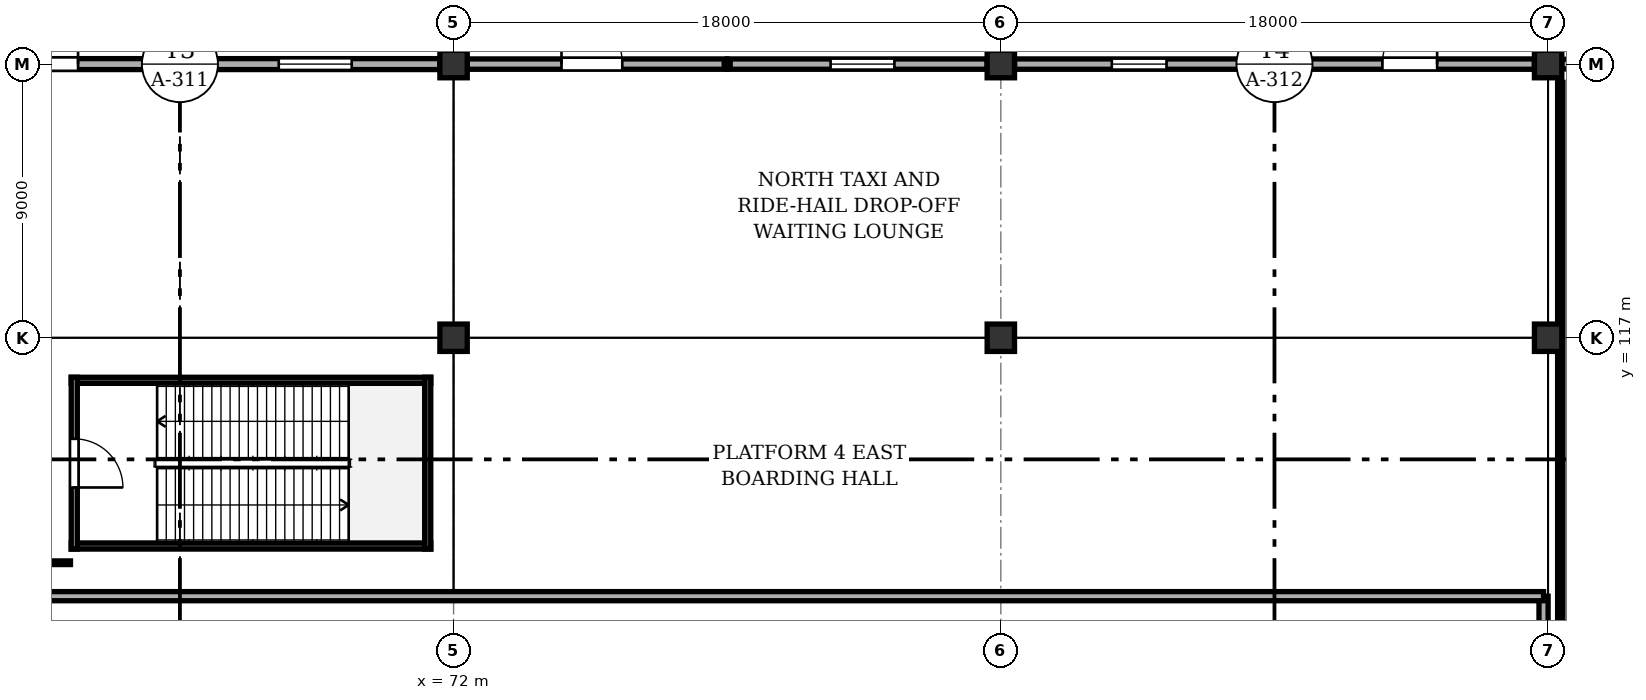
"""IFC4 building model, lengths in metres.
Left out: names, types, materials, properties, quantities, classifications, styles, units other than length and angle.
Written with IfcOpenShell. Run it as: python <this file> out.ifc"""

import sys

from ifc_helpers import new_model, si_unit, direction, frame, frame_2d, origin, origin_2d, place, context, subcontext, project, spatial, rectangle, i_section, extrude, element, fill, save


model = new_model("IFC4")
c1 = context("Model", 3, precision=1e-05, world=origin(), true_north=direction((0.0, 1.0)))
c2 = subcontext(c1, "Body", "Model", "MODEL_VIEW")
j1 = project(units=[si_unit("LENGTHUNIT", "METRE"), si_unit("PLANEANGLEUNIT", "RADIAN")], contexts=[c1])
p1 = place(None, origin())
s1 = spatial("IfcSite", under=j1, at=p1, CompositionType="ELEMENT")
p2 = place(p1, origin())
s2 = spatial("IfcBuilding", under=s1, at=p2, CompositionType="ELEMENT")
p3 = place(p2, origin())
s3 = spatial("IfcBuildingStorey", under=s2, at=p3, CompositionType="ELEMENT", Elevation=0.0)
for number, where, z_axis, x_axis in (
    (1, (72.0, 117.0, 0.0), (0.0, 0.0, 1.0), (1.0, 0.0, 0.0)),
    (2, (72.0, 126.0, 0.0), (0.0, 0.0, 1.0), (1.0, 0.0, 0.0)),
    (3, (90.0, 117.0, 0.0), (0.0, 0.0, 1.0), (1.0, 0.0, 0.0)),
    (4, (90.0, 126.0, 0.0), (0.0, 0.0, 1.0), (1.0, 0.0, 0.0)),
    (5, (108.0, 117.0, 0.0), (0.0, 0.0, 1.0), (1.0, 0.0, 0.0)),
    (6, (108.0, 126.0, 0.0), (0.0, 0.0, 1.0), (1.0, 0.0, 0.0)),
):
    element("IfcColumn", number, at=place(p3, frame(where, z_axis=z_axis, x_axis=x_axis)), inside=s3, PredefinedType="COLUMN", context=c2, shape_type="SweptSolid", body=[
        extrude(rectangle(XDim=0.9, YDim=0.9, at=origin_2d()), origin(), (0.0, 0.0, 1.0), 6.6),
    ])
p4 = place(p3, frame((63.0, 126.0, 0.0), z_axis=(0.0, 0.0, 1.0), x_axis=(1.0, 0.0, 0.0)))
e7 = element("IfcColumn", 7, at=p4, inside=s3, PredefinedType="PILASTER", context=c2, shape_type="SweptSolid", body=[
    extrude(rectangle(XDim=0.6, YDim=0.4, at=origin_2d()), origin(), (0.0, 0.0, 1.0), 6.28),
])
p5 = place(p3, frame((81.0, 126.0, 0.0), z_axis=(0.0, 0.0, 1.0), x_axis=(1.0, 0.0, 0.0)))
e8 = element("IfcColumn", 8, at=p5, inside=s3, PredefinedType="PILASTER", context=c2, shape_type="SweptSolid", body=[
    extrude(i_section(OverallWidth=0.2, OverallDepth=0.2, WebThickness=0.008, FlangeThickness=0.012, FilletRadius=0.013, at=origin_2d()), origin(), (0.0, 0.0, 1.0), 6.28),
])
p6 = place(p3, frame((99.0, 126.0, 0.0), z_axis=(0.0, 0.0, 1.0), x_axis=(1.0, 0.0, 0.0)))
e9 = element("IfcColumn", 9, at=p6, inside=s3, PredefinedType="PILASTER", context=c2, shape_type="SweptSolid", body=[
    extrude(rectangle(XDim=0.6, YDim=0.4, at=origin_2d()), origin(), (0.0, 0.0, 1.0), 6.28),
])
p7 = place(p3, frame((107.85, 103.5, -1.25), z_axis=(0.0, 0.0, 1.0), x_axis=(0.0, 1.0, 0.0)))
e10 = element("IfcWall", 10, at=p7, inside=s3, PredefinedType="SOLIDWALL", context=c2, shape_type="SweptSolid", body=[
    extrude(rectangle(XDim=5.0, YDim=0.3, at=frame_2d((2.5, 0.0))), origin(), (0.0, 0.0, 1.0), 2.5),
])
p8 = place(p3, frame((0.15, 108.5, -1.25), z_axis=(0.0, 0.0, 1.0), x_axis=(1.0, 0.0, 0.0)))
e11 = element("IfcWall", 11, at=p8, inside=s3, PredefinedType="SOLIDWALL", context=c2, shape_type="SweptSolid", body=[
    extrude(rectangle(XDim=107.7, YDim=0.3, at=frame_2d((53.85, 0.0))), origin(), (0.0, 0.0, 1.0), 0.87),
])
p9 = place(p3, frame((54.45, 126.0, 0.0), z_axis=(0.0, 0.0, 1.0), x_axis=(1.0, 0.0, 0.0)))
e12 = element("IfcWall", 12, at=p9, inside=s3, PredefinedType="SOLIDWALL", context=c2, shape_type="SweptSolid", body=[
    extrude(rectangle(XDim=8.25, YDim=0.36, at=frame_2d((4.125, 0.0))), origin(), (0.0, 0.0, 1.0), 5.79),
])
p10 = place(p9, frame((3.0, 0.0, 0.0)))
e13 = element("IfcOpeningElement", 13, at=p10, cuts=e12, PredefinedType="OPENING", context=c2, shape_type="SweptSolid", body=[
    extrude(rectangle(XDim=2.2, YDim=2.45, at=frame_2d((1.1, 1.225))), frame((0.0, 0.19, 0.0), z_axis=(0.0, -1.0, 0.0), x_axis=(1.0, 0.0, 0.0)), (0.0, 0.0, 1.0), 0.38),
])
p11 = place(p3, frame((63.3, 126.0, 0.0), z_axis=(0.0, 0.0, 1.0), x_axis=(1.0, 0.0, 0.0)))
e14 = element("IfcWall", 14, at=p11, inside=s3, PredefinedType="SOLIDWALL", context=c2, shape_type="SweptSolid", body=[
    extrude(rectangle(XDim=8.25, YDim=0.36, at=frame_2d((4.125, 0.0))), origin(), (0.0, 0.0, 1.0), 5.79),
])
p12 = place(p11, frame((2.95, 0.0, 0.95)))
e15 = element("IfcOpeningElement", 15, at=p12, cuts=e14, PredefinedType="OPENING", context=c2, shape_type="SweptSolid", body=[
    extrude(rectangle(XDim=2.4, YDim=2.1, at=frame_2d((1.2, 1.05))), frame((0.0, 0.19, 0.0), z_axis=(0.0, -1.0, 0.0), x_axis=(1.0, 0.0, 0.0)), (0.0, 0.0, 1.0), 0.38),
])
p13 = place(p3, frame((72.45, 126.0, 0.0), z_axis=(0.0, 0.0, 1.0), x_axis=(1.0, 0.0, 0.0)))
e16 = element("IfcWall", 16, at=p13, inside=s3, PredefinedType="SOLIDWALL", context=c2, shape_type="SweptSolid", body=[
    extrude(rectangle(XDim=8.546, YDim=0.34, at=frame_2d((4.273, 0.0))), origin(), (0.0, 0.0, 1.0), 5.79),
])
p14 = place(p13, frame((3.1, 0.0, 0.0)))
e17 = element("IfcOpeningElement", 17, at=p14, cuts=e16, PredefinedType="OPENING", context=c2, shape_type="SweptSolid", body=[
    extrude(rectangle(XDim=2.0, YDim=2.4, at=frame_2d((1.0, 1.2))), frame((0.0, 0.18, 0.0), z_axis=(0.0, -1.0, 0.0), x_axis=(1.0, 0.0, 0.0)), (0.0, 0.0, 1.0), 0.36),
])
p15 = place(p3, frame((81.004, 126.0, 0.0), z_axis=(0.0, 0.0, 1.0), x_axis=(1.0, 0.0, 0.0)))
e18 = element("IfcWall", 18, at=p15, inside=s3, PredefinedType="SOLIDWALL", context=c2, shape_type="SweptSolid", body=[
    extrude(rectangle(XDim=8.546, YDim=0.34, at=frame_2d((4.273, 0.0))), origin(), (0.0, 0.0, 1.0), 5.79),
])
p16 = place(p15, frame((3.396, 0.0, 0.95)))
e19 = element("IfcOpeningElement", 19, at=p16, cuts=e18, PredefinedType="OPENING", context=c2, shape_type="SweptSolid", body=[
    extrude(rectangle(XDim=2.1, YDim=2.0, at=frame_2d((1.05, 1.0))), frame((0.0, 0.18, 0.0), z_axis=(0.0, -1.0, 0.0), x_axis=(1.0, 0.0, 0.0)), (0.0, 0.0, 1.0), 0.36),
])
p17 = place(p3, frame((90.45, 126.0, 0.0), z_axis=(0.0, 0.0, 1.0), x_axis=(1.0, 0.0, 0.0)))
e20 = element("IfcWall", 20, at=p17, inside=s3, PredefinedType="SOLIDWALL", context=c2, shape_type="SweptSolid", body=[
    extrude(rectangle(XDim=8.25, YDim=0.34, at=frame_2d((4.125, 0.0))), origin(), (0.0, 0.0, 1.0), 5.79),
])
p18 = place(p17, frame((3.2, 0.0, 0.95)))
e21 = element("IfcOpeningElement", 21, at=p18, cuts=e20, PredefinedType="OPENING", context=c2, shape_type="SweptSolid", body=[
    extrude(rectangle(XDim=1.8, YDim=2.0, at=frame_2d((0.9, 1.0))), frame((0.0, 0.18, 0.0), z_axis=(0.0, -1.0, 0.0), x_axis=(1.0, 0.0, 0.0)), (0.0, 0.0, 1.0), 0.36),
])
p19 = place(p3, frame((99.3, 126.0, 0.0), z_axis=(0.0, 0.0, 1.0), x_axis=(1.0, 0.0, 0.0)))
e22 = element("IfcWall", 22, at=p19, inside=s3, PredefinedType="SOLIDWALL", context=c2, shape_type="SweptSolid", body=[
    extrude(rectangle(XDim=8.25, YDim=0.34, at=frame_2d((4.125, 0.0))), origin(), (0.0, 0.0, 1.0), 5.79),
])
p20 = place(p19, frame((3.25, 0.0, 0.0)))
e23 = element("IfcOpeningElement", 23, at=p20, cuts=e22, PredefinedType="OPENING", context=c2, shape_type="SweptSolid", body=[
    extrude(rectangle(XDim=1.8, YDim=2.35, at=frame_2d((0.9, 1.175))), frame((0.0, 0.18, 0.0), z_axis=(0.0, -1.0, 0.0), x_axis=(1.0, 0.0, 0.0)), (0.0, 0.0, 1.0), 0.36),
])
p21 = place(p3, frame((108.45, 126.0, 0.0), z_axis=(0.0, 0.0, 1.0), x_axis=(1.0, 0.0, 0.0)))
e24 = element("IfcWall", 24, at=p21, inside=s3, PredefinedType="SOLIDWALL", context=c2, shape_type="SweptSolid", body=[
    extrude(rectangle(XDim=8.1, YDim=0.32, at=frame_2d((4.05, 0.0))), origin(), (0.0, 0.0, 1.0), 5.79),
])
p22 = place(p21, frame((3.3, 0.0, 0.95)))
e25 = element("IfcOpeningElement", 25, at=p22, cuts=e24, PredefinedType="OPENING", context=c2, shape_type="SweptSolid", body=[
    extrude(rectangle(XDim=1.6, YDim=1.9, at=frame_2d((0.8, 0.95))), frame((0.0, 0.17, 0.0), z_axis=(0.0, -1.0, 0.0), x_axis=(1.0, 0.0, 0.0)), (0.0, 0.0, 1.0), 0.34),
])
for number, where, z_axis, x_axis in (
    (26, (59.425, 110.15, 0.0), (0.0, 0.0, 1.0), (1.0, 0.0, 0.0)),
    (27, (71.25, 115.6, 0.0), (0.0, 0.0, 1.0), (-1.0, 0.0, 0.0)),
):
    element("IfcWall", number, at=place(p3, frame(where, z_axis=z_axis, x_axis=x_axis)), inside=s3, PredefinedType="SOLIDWALL", context=c2, shape_type="SweptSolid", body=[
        extrude(rectangle(XDim=11.825, YDim=0.2, at=frame_2d((5.913, 0.0))), origin(), (0.0, 0.0, 1.0), 6.32),
    ])
p23 = place(p3, frame((71.15, 110.05, 0.0), z_axis=(0.0, 0.0, 1.0), x_axis=(0.0, 1.0, 0.0)))
e28 = element("IfcWall", 28, at=p23, inside=s3, PredefinedType="SOLIDWALL", context=c2, shape_type="SweptSolid", body=[
    extrude(rectangle(XDim=5.65, YDim=0.2, at=frame_2d((2.825, 0.0))), origin(), (0.0, 0.0, 1.0), 6.32),
])
p24 = place(p3, frame((59.525, 115.7, 0.0), z_axis=(0.0, 0.0, 1.0), x_axis=(0.0, -1.0, 0.0)))
e29 = element("IfcWall", 29, at=p24, inside=s3, PredefinedType="SOLIDWALL", context=c2, shape_type="SweptSolid", body=[
    extrude(rectangle(XDim=5.65, YDim=0.2, at=frame_2d((2.825, 0.0))), origin(), (0.0, 0.0, 1.0), 4.4),
])
p25 = place(p24, frame((2.025, 0.0, 0.0)))
e30 = element("IfcOpeningElement", 30, at=p25, cuts=e29, PredefinedType="OPENING", context=c2, shape_type="SweptSolid", body=[
    extrude(rectangle(XDim=1.6, YDim=2.15, at=frame_2d((0.8, 1.075))), frame((0.0, 0.11, 0.0), z_axis=(0.0, -1.0, 0.0), x_axis=(1.0, 0.0, 0.0)), (0.0, 0.0, 1.0), 0.22),
])
p26 = place(p3, frame((59.4, 109.6, 0.0), z_axis=(0.0, 0.0, 1.0), x_axis=(-1.0, 0.0, 0.0)))
e31 = element("IfcWall", 31, at=p26, inside=s3, PredefinedType="PARTITIONING", context=c2, shape_type="SweptSolid", body=[
    extrude(rectangle(XDim=2.6, YDim=0.12, at=frame_2d((1.3, 0.0))), origin(), (0.0, 0.0, 1.0), 4.4),
])
p27 = place(p3, frame((108.4, 104.6, 0.0), z_axis=(0.0, 0.0, 1.0), x_axis=(0.0, 1.0, 0.0)))
e32 = element("IfcWall", 32, at=p27, inside=s3, PredefinedType="PARTITIONING", context=c2, shape_type="SweptSolid", body=[
    extrude(rectangle(XDim=20.8, YDim=0.175, at=frame_2d((10.4, 0.0))), origin(), (0.0, 0.0, 1.0), 4.4),
])
p28 = place(p10, origin())
e33 = element("IfcDoor", 33, at=p28, inside=s3, OperationType="SINGLE_SWING_RIGHT", PredefinedType="DOOR", context=c2, shape_type="SweptSolid", body=[
    extrude(rectangle(XDim=2.2, YDim=2.45, at=frame_2d((1.1, 1.225))), frame((0.0, 0.025, 0.0), z_axis=(0.0, -1.0, 0.0), x_axis=(1.0, 0.0, 0.0)), (0.0, 0.0, 1.0), 0.05),
])
fill(e13, e33)
p29 = place(p12, origin())
e34 = element("IfcWindow", 34, at=p29, inside=s3, PartitioningType="SINGLE_PANEL", PredefinedType="WINDOW", context=c2, shape_type="SweptSolid", body=[
    extrude(rectangle(XDim=2.4, YDim=2.1, at=frame_2d((1.2, 1.05))), frame((0.0, 0.03, 0.0), z_axis=(0.0, -1.0, 0.0), x_axis=(1.0, 0.0, 0.0)), (0.0, 0.0, 1.0), 0.06),
])
fill(e15, e34)
p30 = place(p14, origin())
e35 = element("IfcDoor", 35, at=p30, inside=s3, OperationType="SINGLE_SWING_LEFT", PredefinedType="DOOR", context=c2, shape_type="SweptSolid", body=[
    extrude(rectangle(XDim=2.0, YDim=2.4, at=frame_2d((1.0, 1.2))), frame((0.0, 0.025, 0.0), z_axis=(0.0, -1.0, 0.0), x_axis=(1.0, 0.0, 0.0)), (0.0, 0.0, 1.0), 0.05),
])
fill(e17, e35)
p31 = place(p16, origin())
e36 = element("IfcWindow", 36, at=p31, inside=s3, PartitioningType="SINGLE_PANEL", PredefinedType="WINDOW", context=c2, shape_type="SweptSolid", body=[
    extrude(rectangle(XDim=2.1, YDim=2.0, at=frame_2d((1.05, 1.0))), frame((0.0, 0.03, 0.0), z_axis=(0.0, -1.0, 0.0), x_axis=(1.0, 0.0, 0.0)), (0.0, 0.0, 1.0), 0.06),
])
fill(e19, e36)
p32 = place(p18, origin())
e37 = element("IfcWindow", 37, at=p32, inside=s3, PartitioningType="SINGLE_PANEL", PredefinedType="WINDOW", context=c2, shape_type="SweptSolid", body=[
    extrude(rectangle(XDim=1.8, YDim=2.0, at=frame_2d((0.9, 1.0))), frame((0.0, 0.03, 0.0), z_axis=(0.0, -1.0, 0.0), x_axis=(1.0, 0.0, 0.0)), (0.0, 0.0, 1.0), 0.06),
])
fill(e21, e37)
p33 = place(p20, origin())
e38 = element("IfcDoor", 38, at=p33, inside=s3, OperationType="SINGLE_SWING_RIGHT", PredefinedType="DOOR", context=c2, shape_type="SweptSolid", body=[
    extrude(rectangle(XDim=1.8, YDim=2.35, at=frame_2d((0.9, 1.175))), frame((0.0, 0.025, 0.0), z_axis=(0.0, -1.0, 0.0), x_axis=(1.0, 0.0, 0.0)), (0.0, 0.0, 1.0), 0.05),
])
fill(e23, e38)
p34 = place(p25, origin())
e39 = element("IfcDoor", 39, at=p34, inside=s3, OperationType="SINGLE_SWING_RIGHT", PredefinedType="DOOR", context=c2, shape_type="SweptSolid", body=[
    extrude(rectangle(XDim=1.6, YDim=2.15, at=frame_2d((0.8, 1.075))), frame((0.0, 0.025, 0.0), z_axis=(0.0, -1.0, 0.0), x_axis=(1.0, 0.0, 0.0)), (0.0, 0.0, 1.0), 0.05),
])
fill(e30, e39)
save(model, sys.argv[1])
